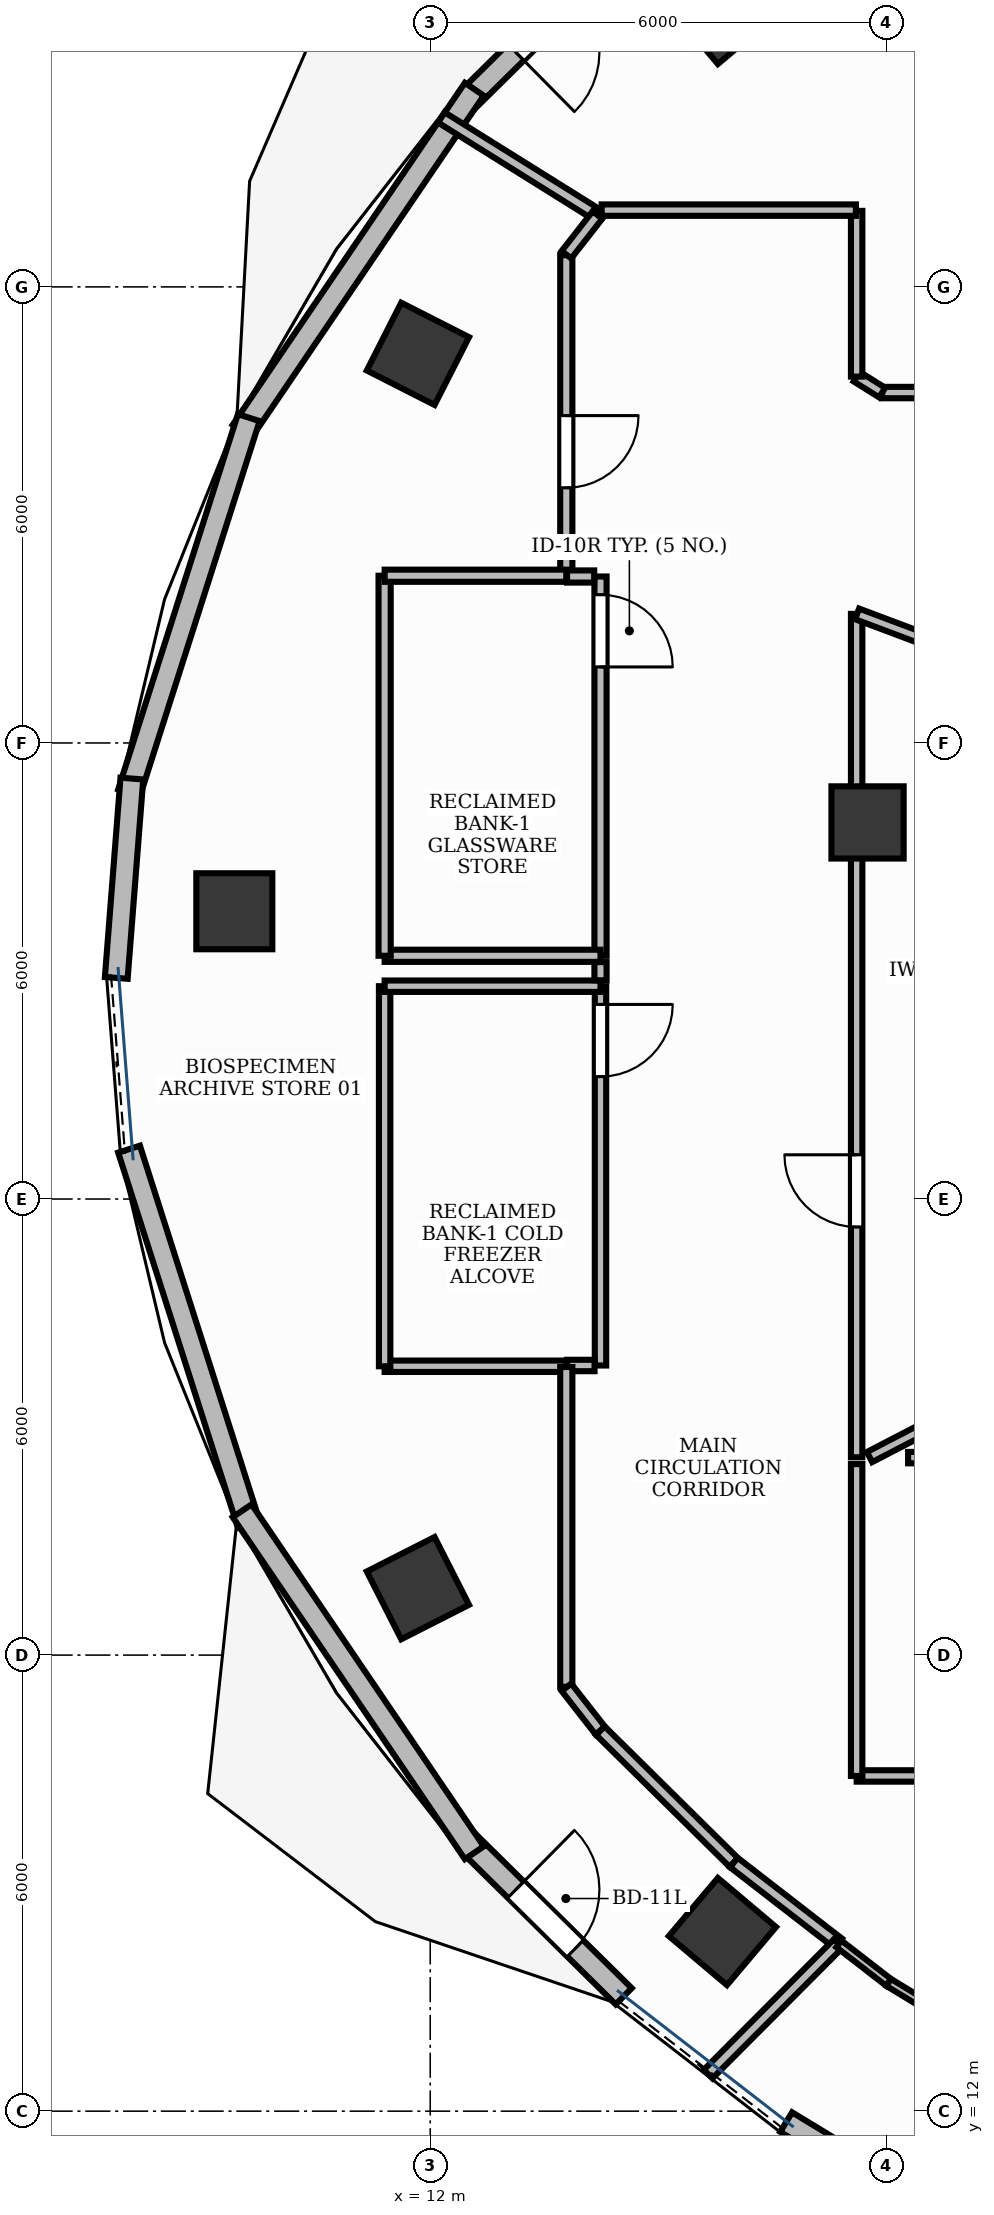
"""IFC4 building model, lengths in metres.
Left out: names, types, materials, properties, quantities, classifications, styles, units other than length and angle.
Written with IfcOpenShell. Run it as: python <this file> out.ifc"""

import sys

from ifc_helpers import new_model, si_unit, direction, frame, frame_2d, origin, origin_2d, place, context, subcontext, project, spatial, rectangle, extrude, element, fill, save


model = new_model("IFC4")
c1 = context("Model", 3, precision=1e-05, world=origin(), true_north=direction((0.0, 1.0)))
c2 = subcontext(c1, "Body", "Model", "MODEL_VIEW")
j1 = project(units=[si_unit("LENGTHUNIT", "METRE"), si_unit("PLANEANGLEUNIT", "RADIAN")], contexts=[c1])
p1 = place(None, origin())
s1 = spatial("IfcSite", under=j1, at=p1, CompositionType="ELEMENT")
p2 = place(p1, origin())
s2 = spatial("IfcBuilding", under=s1, at=p2, CompositionType="ELEMENT")
p3 = place(p2, frame((0.0, 0.0, 183.6)))
s3 = spatial("IfcBuildingStorey", under=s2, at=p3, CompositionType="ELEMENT", Elevation=183.6)
for number, where, z_axis, x_axis in (
    (1, (15.844, 39.637, -0.0), (0.0, 0.0, 1.0), (0.764, 0.645, 0.0)),
    (2, (11.838, 35.119, -0.0), (0.0, 0.0, 1.0), (0.453, 0.891, 0.0)),
    (3, (9.423, 27.786, -0.0), (0.0, 0.0, 1.0), (0.0, 1.0, 0.0)),
):
    element("IfcColumn", number, at=place(p3, frame(where, z_axis=z_axis, x_axis=x_axis)), inside=s3, PredefinedType="COLUMN", context=c2, shape_type="SweptSolid", body=[
        extrude(rectangle(XDim=1.0, YDim=1.0, at=origin_2d()), origin(), (0.0, 0.0, 1.0), 3.901),
    ])
p4 = place(p3, frame((17.753, 28.955, -0.0), z_axis=(0.0, 0.0, 1.0), x_axis=(1.0, 0.0, 0.0)))
e4 = element("IfcColumn", 4, at=p4, inside=s3, PredefinedType="COLUMN", context=c2, shape_type="SweptSolid", body=[
    extrude(rectangle(XDim=0.95, YDim=0.95, at=origin_2d()), origin(), (0.0, 0.0, 1.0), 3.901),
])
for number, where, z_axis, x_axis in (
    (5, (11.838, 18.881, -0.0), (0.0, 0.0, 1.0), (-0.453, 0.891, 0.0)),
    (6, (15.844, 14.363, -0.0), (0.0, 0.0, 1.0), (-0.764, 0.645, 0.0)),
):
    element("IfcColumn", number, at=place(p3, frame(where, z_axis=z_axis, x_axis=x_axis)), inside=s3, PredefinedType="COLUMN", context=c2, shape_type="SweptSolid", body=[
        extrude(rectangle(XDim=1.0, YDim=1.0, at=origin_2d()), origin(), (0.0, 0.0, 1.0), 3.901),
    ])
p5 = place(p3, frame((14.546, 40.489, 0.0), z_axis=(0.0, 0.0, 1.0), x_axis=(-0.711442799636, -0.70274400947, 0.0)))
e7 = element("IfcWall", 7, at=p5, inside=s3, PredefinedType="STANDARD", context=c2, shape_type="SweptSolid", body=[
    extrude(rectangle(XDim=2.891, YDim=0.3, at=frame_2d((1.445, 0.0))), origin(), (0.0, 0.0, 1.0), 3.9),
])
p6 = place(p5, frame((0.896, 0.0, 0.0)))
e8 = element("IfcOpeningElement", 8, at=p6, cuts=e7, PredefinedType="OPENING", context=c2, shape_type="SweptSolid", body=[
    extrude(rectangle(XDim=1.1, YDim=2.15, at=frame_2d((0.55, 1.075))), frame((0.0, 0.165, 0.0), z_axis=(0.0, -1.0, 0.0), x_axis=(1.0, 0.0, 0.0)), (0.0, 0.0, 1.0), 0.33),
])
p7 = place(p3, frame((12.489, 15.543, 0.0), z_axis=(0.0, 0.0, 1.0), x_axis=(0.711442799636, -0.70274400947, 0.0)))
e9 = element("IfcWall", 9, at=p7, inside=s3, PredefinedType="STANDARD", context=c2, shape_type="SweptSolid", body=[
    extrude(rectangle(XDim=2.891, YDim=0.3, at=frame_2d((1.445, 0.0))), origin(), (0.0, 0.0, 1.0), 3.9),
])
p8 = place(p7, frame((0.896, 0.0, 0.0)))
e10 = element("IfcOpeningElement", 10, at=p8, cuts=e9, PredefinedType="OPENING", context=c2, shape_type="SweptSolid", body=[
    extrude(rectangle(XDim=1.1, YDim=2.15, at=frame_2d((0.55, 1.075))), frame((0.0, 0.165, 0.0), z_axis=(0.0, -1.0, 0.0), x_axis=(1.0, 0.0, 0.0)), (0.0, 0.0, 1.0), 0.33),
])
p9 = place(p3, frame((16.683, 11.856, 0.0), z_axis=(0.0, 0.0, 1.0), x_axis=(0.85455658592, -0.519358297769, 0.0)))
e11 = element("IfcWall", 11, at=p9, inside=s3, PredefinedType="STANDARD", context=c2, shape_type="SweptSolid", body=[
    extrude(rectangle(XDim=3.066, YDim=0.3, at=frame_2d((1.533, 0.0))), origin(), (0.0, 0.0, 1.0), 3.9),
])
p10 = place(p9, frame((0.783, 0.0, 0.95)))
e12 = element("IfcOpeningElement", 12, at=p10, cuts=e11, PredefinedType="OPENING", context=c2, shape_type="SweptSolid", body=[
    extrude(rectangle(XDim=1.5, YDim=1.8, at=frame_2d((0.75, 0.9))), frame((0.0, 0.165, 0.0), z_axis=(0.0, -1.0, 0.0), x_axis=(1.0, 0.0, 0.0)), (0.0, 0.0, 1.0), 0.33),
])
p11 = place(p3, frame((12.58, 38.601, 0.0), z_axis=(0.0, 0.0, 1.0), x_axis=(-0.561663900064, -0.827365495634, 0.0)))
e13 = element("IfcWall", 13, at=p11, inside=s3, PredefinedType="STANDARD", context=c2, shape_type="SweptSolid", body=[
    extrude(rectangle(XDim=5.438, YDim=0.3, at=frame_2d((2.719, 0.0))), origin(), (0.0, 0.0, 1.0), 3.47),
])
p12 = place(p3, frame((9.613, 34.28, 0.0), z_axis=(0.0, 0.0, 1.0), x_axis=(-0.303930984078, -0.952694052106, 0.0)))
e14 = element("IfcWall", 14, at=p12, inside=s3, PredefinedType="STANDARD", context=c2, shape_type="SweptSolid", body=[
    extrude(rectangle(XDim=5.181, YDim=0.3, at=frame_2d((2.591, 0.0))), origin(), (0.0, 0.0, 1.0), 3.47),
])
p13 = place(p3, frame((8.075, 29.531, 0.0), z_axis=(0.0, 0.0, 1.0), x_axis=(-0.078059201014, -0.99694872543, 0.0)))
e15 = element("IfcWall", 15, at=p13, inside=s3, PredefinedType="STANDARD", context=c2, shape_type="SweptSolid", body=[
    extrude(rectangle(XDim=2.63, YDim=0.3, at=frame_2d((1.315, 0.0))), origin(), (0.0, 0.0, 1.0), 3.47),
])
p14 = place(p3, frame((8.038, 24.656, 0.0), z_axis=(0.0, 0.0, 1.0), x_axis=(0.303930984078, -0.952694052106, 0.0)))
e16 = element("IfcWall", 16, at=p14, inside=s3, PredefinedType="STANDARD", context=c2, shape_type="SweptSolid", body=[
    extrude(rectangle(XDim=5.181, YDim=0.3, at=frame_2d((2.591, 0.0))), origin(), (0.0, 0.0, 1.0), 3.9),
])
p15 = place(p3, frame((9.526, 19.898, 0.0), z_axis=(0.0, 0.0, 1.0), x_axis=(0.561663900064, -0.827365495634, 0.0)))
e17 = element("IfcWall", 17, at=p15, inside=s3, PredefinedType="STANDARD", context=c2, shape_type="SweptSolid", body=[
    extrude(rectangle(XDim=5.438, YDim=0.3, at=frame_2d((2.719, 0.0))), origin(), (0.0, 0.0, 1.0), 3.9),
])
p16 = place(p3, frame((14.24, 26.8, 0.0), z_axis=(0.0, 0.0, 1.0), x_axis=(0.0, -1.0, 0.0)))
e18 = element("IfcWall", 18, at=p16, inside=s3, PredefinedType="PARTITIONING", context=c2, shape_type="SweptSolid", body=[
    extrude(rectangle(XDim=4.99, YDim=0.15, at=frame_2d((2.495, 0.0))), origin(), (0.0, 0.0, 1.0), 2.91),
])
p17 = place(p16, frame((0.24, 0.0, 0.0)))
e19 = element("IfcOpeningElement", 19, at=p17, cuts=e18, PredefinedType="OPENING", context=c2, shape_type="SweptSolid", body=[
    extrude(rectangle(XDim=0.95, YDim=2.15, at=frame_2d((0.475, 1.075))), frame((0.0, 0.09, 0.0), z_axis=(0.0, -1.0, 0.0), x_axis=(1.0, 0.0, 0.0)), (0.0, 0.0, 1.0), 0.18),
])
p18 = place(p3, frame((14.24, 32.19, 0.0), z_axis=(0.0, 0.0, 1.0), x_axis=(0.0, -1.0, 0.0)))
e20 = element("IfcWall", 20, at=p18, inside=s3, PredefinedType="PARTITIONING", context=c2, shape_type="SweptSolid", body=[
    extrude(rectangle(XDim=4.99, YDim=0.16, at=frame_2d((2.495, 0.0))), origin(), (0.0, 0.0, 1.0), 2.91),
])
p19 = place(p18, frame((0.24, 0.0, 0.0)))
e21 = element("IfcOpeningElement", 21, at=p19, cuts=e20, PredefinedType="OPENING", context=c2, shape_type="SweptSolid", body=[
    extrude(rectangle(XDim=0.95, YDim=2.15, at=frame_2d((0.475, 1.075))), frame((0.0, 0.095, 0.0), z_axis=(0.0, -1.0, 0.0), x_axis=(1.0, 0.0, 0.0)), (0.0, 0.0, 1.0), 0.19),
])
p20 = place(p3, frame((13.79, 36.417, 0.0), z_axis=(0.0, 0.0, 1.0), x_axis=(0.0, -1.0, 0.0)))
e22 = element("IfcWall", 22, at=p20, inside=s3, PredefinedType="PARTITIONING", context=c2, shape_type="SweptSolid", body=[
    extrude(rectangle(XDim=4.208, YDim=0.16, at=frame_2d((2.104, 0.0))), origin(), (0.0, 0.0, 1.0), 2.91),
])
p21 = place(p20, frame((2.111, 0.0, 0.0)))
e23 = element("IfcOpeningElement", 23, at=p21, cuts=e22, PredefinedType="OPENING", context=c2, shape_type="SweptSolid", body=[
    extrude(rectangle(XDim=0.95, YDim=2.15, at=frame_2d((0.475, 1.075))), frame((0.0, 0.095, 0.0), z_axis=(0.0, -1.0, 0.0), x_axis=(1.0, 0.0, 0.0)), (0.0, 0.0, 1.0), 0.19),
])
p22 = place(p3, frame((17.61, 20.602, 0.0), z_axis=(0.0, 0.0, 1.0), x_axis=(0.0, 1.0, 0.0)))
e24 = element("IfcWall", 24, at=p22, inside=s3, PredefinedType="PARTITIONING", context=c2, shape_type="SweptSolid", body=[
    extrude(rectangle(XDim=11.096, YDim=0.15, at=frame_2d((5.548, 0.0))), origin(), (0.0, 0.0, 1.0), 2.91),
])
p23 = place(p22, frame((3.03, 0.0, 0.0)))
e25 = element("IfcOpeningElement", 25, at=p23, cuts=e24, PredefinedType="OPENING", context=c2, shape_type="SweptSolid", body=[
    extrude(rectangle(XDim=0.95, YDim=2.15, at=frame_2d((0.475, 1.075))), frame((0.0, 0.09, 0.0), z_axis=(0.0, -1.0, 0.0), x_axis=(1.0, 0.0, 0.0)), (0.0, 0.0, 1.0), 0.18),
])
p24 = place(p3, frame((14.162, 21.81, 0.0), z_axis=(0.0, 0.0, 1.0), x_axis=(-1.0, 0.0, 0.0)))
e26 = element("IfcWall", 26, at=p24, inside=s3, PredefinedType="PARTITIONING", context=c2, shape_type="SweptSolid", body=[
    extrude(rectangle(XDim=0.362, YDim=0.15, at=frame_2d((0.181, 0.0))), origin(), (0.0, 0.0, 1.0), 2.91),
])
p25 = place(p3, frame((13.79, 21.8, 0.0), z_axis=(0.0, 0.0, 1.0), x_axis=(-1.0, 0.0, 0.0)))
e27 = element("IfcWall", 27, at=p25, inside=s3, PredefinedType="PARTITIONING", context=c2, shape_type="SweptSolid", body=[
    extrude(rectangle(XDim=2.39, YDim=0.15, at=frame_2d((1.195, 0.0))), origin(), (0.0, 0.0, 1.0), 2.91),
])
p26 = place(p3, frame((11.4, 21.8, 0.0), z_axis=(0.0, 0.0, 1.0), x_axis=(0.0, 1.0, 0.0)))
e28 = element("IfcWall", 28, at=p26, inside=s3, PredefinedType="PARTITIONING", context=c2, shape_type="SweptSolid", body=[
    extrude(rectangle(XDim=5.0, YDim=0.15, at=frame_2d((2.5, 0.0))), origin(), (0.0, 0.0, 1.0), 2.91),
])
p27 = place(p3, frame((11.4, 26.8, 0.0), z_axis=(0.0, 0.0, 1.0), x_axis=(1.0, 0.0, 0.0)))
e29 = element("IfcWall", 29, at=p27, inside=s3, PredefinedType="PARTITIONING", context=c2, shape_type="SweptSolid", body=[
    extrude(rectangle(XDim=2.84, YDim=0.15, at=frame_2d((1.42, 0.0))), origin(), (0.0, 0.0, 1.0), 2.91),
])
p28 = place(p3, frame((13.8, 32.19, 0.0), z_axis=(0.0, 0.0, 1.0), x_axis=(1.0, 0.0, 0.0)))
e30 = element("IfcWall", 30, at=p28, inside=s3, PredefinedType="PARTITIONING", context=c2, shape_type="SweptSolid", body=[
    extrude(rectangle(XDim=0.357, YDim=0.16, at=frame_2d((0.178, 0.0))), origin(), (0.0, 0.0, 1.0), 2.91),
])
p29 = place(p3, frame((14.24, 27.2, 0.0), z_axis=(0.0, 0.0, 1.0), x_axis=(-1.0, 0.0, 0.0)))
e31 = element("IfcWall", 31, at=p29, inside=s3, PredefinedType="PARTITIONING", context=c2, shape_type="SweptSolid", body=[
    extrude(rectangle(XDim=2.84, YDim=0.16, at=frame_2d((1.42, 0.0))), origin(), (0.0, 0.0, 1.0), 2.91),
])
p30 = place(p3, frame((11.4, 27.2, 0.0), z_axis=(0.0, 0.0, 1.0), x_axis=(0.0, 1.0, 0.0)))
e32 = element("IfcWall", 32, at=p30, inside=s3, PredefinedType="PARTITIONING", context=c2, shape_type="SweptSolid", body=[
    extrude(rectangle(XDim=5.0, YDim=0.16, at=frame_2d((2.5, 0.0))), origin(), (0.0, 0.0, 1.0), 2.91),
])
p31 = place(p3, frame((11.4, 32.2, 0.0), z_axis=(0.0, 0.0, 1.0), x_axis=(1.0, 0.0, 0.0)))
e33 = element("IfcWall", 33, at=p31, inside=s3, PredefinedType="PARTITIONING", context=c2, shape_type="SweptSolid", body=[
    extrude(rectangle(XDim=2.39, YDim=0.16, at=frame_2d((1.195, 0.0))), origin(), (0.0, 0.0, 1.0), 2.91),
])
p32 = place(p3, frame((12.146, 38.229, 0.0), z_axis=(0.0, 0.0, 1.0), x_axis=(0.848066263041, -0.529890190031, 0.0)))
e34 = element("IfcWall", 34, at=p32, inside=s3, PredefinedType="PARTITIONING", context=c2, shape_type="SweptSolid", body=[
    extrude(rectangle(XDim=2.422, YDim=0.16, at=frame_2d((1.211, 0.0))), origin(), (0.0, 0.0, 1.0), 2.91),
])
p33 = place(p3, frame((14.2, 36.946, 0.0), z_axis=(0.0, 0.0, 1.0), x_axis=(-0.615851305214, -0.787862405415, 0.0)))
e35 = element("IfcWall", 35, at=p33, inside=s3, PredefinedType="PARTITIONING", context=c2, shape_type="SweptSolid", body=[
    extrude(rectangle(XDim=0.663, YDim=0.16, at=frame_2d((0.332, 0.0))), origin(), (0.0, 0.0, 1.0), 2.91),
])
p34 = place(p3, frame((14.24, 27.117, 0.0), z_axis=(0.0, 0.0, 1.0), x_axis=(0.0, -1.0, 0.0)))
e36 = element("IfcWall", 36, at=p34, inside=s3, PredefinedType="PARTITIONING", context=c2, shape_type="SweptSolid", body=[
    extrude(rectangle(XDim=0.239, YDim=0.16, at=frame_2d((0.12, 0.0))), origin(), (0.0, 0.0, 1.0), 2.91),
])
p35 = place(p3, frame((13.79, 21.79, 0.0), z_axis=(0.0, 0.0, 1.0), x_axis=(0.0, -1.0, 0.0)))
e37 = element("IfcWall", 37, at=p35, inside=s3, PredefinedType="PARTITIONING", context=c2, shape_type="SweptSolid", body=[
    extrude(rectangle(XDim=4.208, YDim=0.16, at=frame_2d((2.104, 0.0))), origin(), (0.0, 0.0, 1.0), 2.91),
])
p36 = place(p3, frame((13.792, 17.576, 0.0), z_axis=(0.0, 0.0, 1.0), x_axis=(0.615925776879, -0.787804187204, 0.0)))
e38 = element("IfcWall", 38, at=p36, inside=s3, PredefinedType="PARTITIONING", context=c2, shape_type="SweptSolid", body=[
    extrude(rectangle(XDim=0.723, YDim=0.16, at=frame_2d((0.361, 0.0))), origin(), (0.0, 0.0, 1.0), 2.91),
])
p37 = place(p3, frame((14.238, 17.006, 0.0), z_axis=(0.0, 0.0, 1.0), x_axis=(0.711447157113, -0.702739598027, 0.0)))
e39 = element("IfcWall", 39, at=p37, inside=s3, PredefinedType="PARTITIONING", context=c2, shape_type="SweptSolid", body=[
    extrude(rectangle(XDim=2.467, YDim=0.16, at=frame_2d((1.234, 0.0))), origin(), (0.0, 0.0, 1.0), 2.91),
])
p38 = place(p3, frame((15.995, 15.271, 0.0), z_axis=(0.0, 0.0, 1.0), x_axis=(0.790583329936, -0.612354471224, 0.0)))
e40 = element("IfcWall", 40, at=p38, inside=s3, PredefinedType="PARTITIONING", context=c2, shape_type="SweptSolid", body=[
    extrude(rectangle(XDim=1.738, YDim=0.16, at=frame_2d((0.869, 0.0))), origin(), (0.0, 0.0, 1.0), 2.91),
])
p39 = place(p3, frame((17.369, 14.207, 0.0), z_axis=(0.0, 0.0, 1.0), x_axis=(-0.705948871301, -0.708262798056, 0.0)))
e41 = element("IfcWall", 41, at=p39, inside=s3, PredefinedType="PARTITIONING", context=c2, shape_type="SweptSolid", body=[
    extrude(rectangle(XDim=2.427, YDim=0.16, at=frame_2d((1.213, 0.0))), origin(), (0.0, 0.0, 1.0), 2.91),
])
p40 = place(p3, frame((17.616, 31.698, 0.0), z_axis=(0.0, 0.0, 1.0), x_axis=(0.936061955156, -0.351835211583, 0.0)))
e42 = element("IfcWall", 42, at=p40, inside=s3, PredefinedType="PARTITIONING", context=c2, shape_type="SweptSolid", body=[
    extrude(rectangle(XDim=1.842, YDim=0.15, at=frame_2d((0.921, 0.0))), origin(), (0.0, 0.0, 1.0), 2.91),
])
p41 = place(p3, frame((19.39, 21.44, 0.0), z_axis=(0.0, 0.0, 1.0), x_axis=(-0.887870664605, -0.460093124197, 0.0)))
e43 = element("IfcWall", 43, at=p41, inside=s3, PredefinedType="PARTITIONING", context=c2, shape_type="SweptSolid", body=[
    extrude(rectangle(XDim=1.813, YDim=0.15, at=frame_2d((0.907, 0.0))), origin(), (0.0, 0.0, 1.0), 2.91),
])
p42 = place(p3, frame((18.287, 20.598, 0.0), z_axis=(0.0, 0.0, 1.0), x_axis=(1.0, 0.0, 0.0)))
e44 = element("IfcWall", 44, at=p42, inside=s3, PredefinedType="PARTITIONING", context=c2, shape_type="SweptSolid", body=[
    extrude(rectangle(XDim=3.503, YDim=0.15, at=frame_2d((1.751, 0.0))), origin(), (0.0, 0.0, 1.0), 2.91),
])
p43 = place(p3, frame((19.564, 16.41, 0.0), z_axis=(0.0, 0.0, 1.0), x_axis=(-1.0, 0.0, 0.0)))
e45 = element("IfcWall", 45, at=p43, inside=s3, PredefinedType="PARTITIONING", context=c2, shape_type="SweptSolid", body=[
    extrude(rectangle(XDim=1.954, YDim=0.15, at=frame_2d((0.977, 0.0))), origin(), (0.0, 0.0, 1.0), 2.91),
])
p44 = place(p3, frame((17.61, 16.41, 0.0), z_axis=(0.0, 0.0, 1.0), x_axis=(0.0, 1.0, 0.0)))
e46 = element("IfcWall", 46, at=p44, inside=s3, PredefinedType="PARTITIONING", context=c2, shape_type="SweptSolid", body=[
    extrude(rectangle(XDim=4.103, YDim=0.15, at=frame_2d((2.052, 0.0))), origin(), (0.0, 0.0, 1.0), 2.91),
])
p45 = place(p3, frame((17.377, 14.2, 0.0), z_axis=(0.0, 0.0, 1.0), x_axis=(0.790511553124, -0.612447127822, 0.0)))
e47 = element("IfcWall", 47, at=p45, inside=s3, PredefinedType="MOVABLE", context=c2, shape_type="SweptSolid", body=[
    extrude(rectangle(XDim=0.827, YDim=0.11, at=frame_2d((0.413, 0.0))), origin(), (0.0, 0.0, 1.0), 2.91),
])
p46 = place(p3, frame((18.031, 13.694, 0.0), z_axis=(0.0, 0.0, 1.0), x_axis=(0.85454497186, -0.51937740716, 0.0)))
e48 = element("IfcWall", 48, at=p46, inside=s3, PredefinedType="MOVABLE", context=c2, shape_type="SweptSolid", body=[
    extrude(rectangle(XDim=2.122, YDim=0.11, at=frame_2d((1.061, 0.0))), origin(), (0.0, 0.0, 1.0), 2.91),
])
p47 = place(p3, frame((21.79, 34.61, 0.0), z_axis=(0.0, 0.0, 1.0), x_axis=(-1.0, 0.0, 0.0)))
e49 = element("IfcWall", 49, at=p47, inside=s3, PredefinedType="PARTITIONING", context=c2, shape_type="SweptSolid", body=[
    extrude(rectangle(XDim=3.844, YDim=0.15, at=frame_2d((1.922, 0.0))), origin(), (0.0, 0.0, 1.0), 2.91),
])
p48 = place(p3, frame((17.946, 34.61, 0.0), z_axis=(0.0, 0.0, 1.0), x_axis=(-0.84820632616, 0.529665959131, 0.0)))
e50 = element("IfcWall", 50, at=p48, inside=s3, PredefinedType="PARTITIONING", context=c2, shape_type="SweptSolid", body=[
    extrude(rectangle(XDim=0.396, YDim=0.15, at=frame_2d((0.198, 0.0))), origin(), (0.0, 0.0, 1.0), 2.91),
])
p49 = place(p3, frame((17.61, 34.82, 0.0), z_axis=(0.0, 0.0, 1.0), x_axis=(0.0, 1.0, 0.0)))
e51 = element("IfcWall", 51, at=p49, inside=s3, PredefinedType="PARTITIONING", context=c2, shape_type="SweptSolid", body=[
    extrude(rectangle(XDim=2.18, YDim=0.15, at=frame_2d((1.09, 0.0))), origin(), (0.0, 0.0, 1.0), 2.91),
])
p50 = place(p3, frame((17.6, 37.01, 0.0), z_axis=(0.0, 0.0, 1.0), x_axis=(-1.0, 0.0, 0.0)))
e52 = element("IfcWall", 52, at=p50, inside=s3, PredefinedType="PARTITIONING", context=c2, shape_type="SweptSolid", body=[
    extrude(rectangle(XDim=3.345, YDim=0.15, at=frame_2d((1.672, 0.0))), origin(), (0.0, 0.0, 1.0), 2.91),
])
p51 = place(p6, origin())
e53 = element("IfcDoor", 53, at=p51, inside=s3, OperationType="SINGLE_SWING_RIGHT", PredefinedType="DOOR", context=c2, shape_type="SweptSolid", body=[
    extrude(rectangle(XDim=1.1, YDim=2.15, at=frame_2d((0.55, 1.075))), frame((0.0, 0.025, 0.0), z_axis=(0.0, -1.0, 0.0), x_axis=(1.0, 0.0, 0.0)), (0.0, 0.0, 1.0), 0.05),
])
fill(e8, e53)
p52 = place(p8, origin())
e54 = element("IfcDoor", 54, at=p52, inside=s3, OperationType="SINGLE_SWING_LEFT", PredefinedType="DOOR", context=c2, shape_type="SweptSolid", body=[
    extrude(rectangle(XDim=1.1, YDim=2.15, at=frame_2d((0.55, 1.075))), frame((0.0, 0.025, 0.0), z_axis=(0.0, -1.0, 0.0), x_axis=(1.0, 0.0, 0.0)), (0.0, 0.0, 1.0), 0.05),
])
fill(e10, e54)
p53 = place(p17, origin())
e55 = element("IfcDoor", 55, at=p53, inside=s3, OperationType="SINGLE_SWING_LEFT", PredefinedType="DOOR", context=c2, shape_type="SweptSolid", body=[
    extrude(rectangle(XDim=0.95, YDim=2.15, at=frame_2d((0.475, 1.075))), frame((0.0, 0.025, 0.0), z_axis=(0.0, -1.0, 0.0), x_axis=(1.0, 0.0, 0.0)), (0.0, 0.0, 1.0), 0.05),
])
fill(e19, e55)
p54 = place(p19, origin())
e56 = element("IfcDoor", 56, at=p54, inside=s3, OperationType="SINGLE_SWING_RIGHT", PredefinedType="DOOR", context=c2, shape_type="SweptSolid", body=[
    extrude(rectangle(XDim=0.95, YDim=2.15, at=frame_2d((0.475, 1.075))), frame((0.0, 0.025, 0.0), z_axis=(0.0, -1.0, 0.0), x_axis=(1.0, 0.0, 0.0)), (0.0, 0.0, 1.0), 0.05),
])
fill(e21, e56)
p55 = place(p21, origin())
e57 = element("IfcDoor", 57, at=p55, inside=s3, OperationType="SINGLE_SWING_LEFT", PredefinedType="DOOR", context=c2, shape_type="SweptSolid", body=[
    extrude(rectangle(XDim=0.95, YDim=2.15, at=frame_2d((0.475, 1.075))), frame((0.0, 0.025, 0.0), z_axis=(0.0, -1.0, 0.0), x_axis=(1.0, 0.0, 0.0)), (0.0, 0.0, 1.0), 0.05),
])
fill(e23, e57)
p56 = place(p23, origin())
e58 = element("IfcDoor", 58, at=p56, inside=s3, OperationType="SINGLE_SWING_RIGHT", PredefinedType="DOOR", context=c2, shape_type="SweptSolid", body=[
    extrude(rectangle(XDim=0.95, YDim=2.15, at=frame_2d((0.475, 1.075))), frame((0.0, 0.025, 0.0), z_axis=(0.0, -1.0, 0.0), x_axis=(1.0, 0.0, 0.0)), (0.0, 0.0, 1.0), 0.05),
])
fill(e25, e58)
save(model, sys.argv[1])
